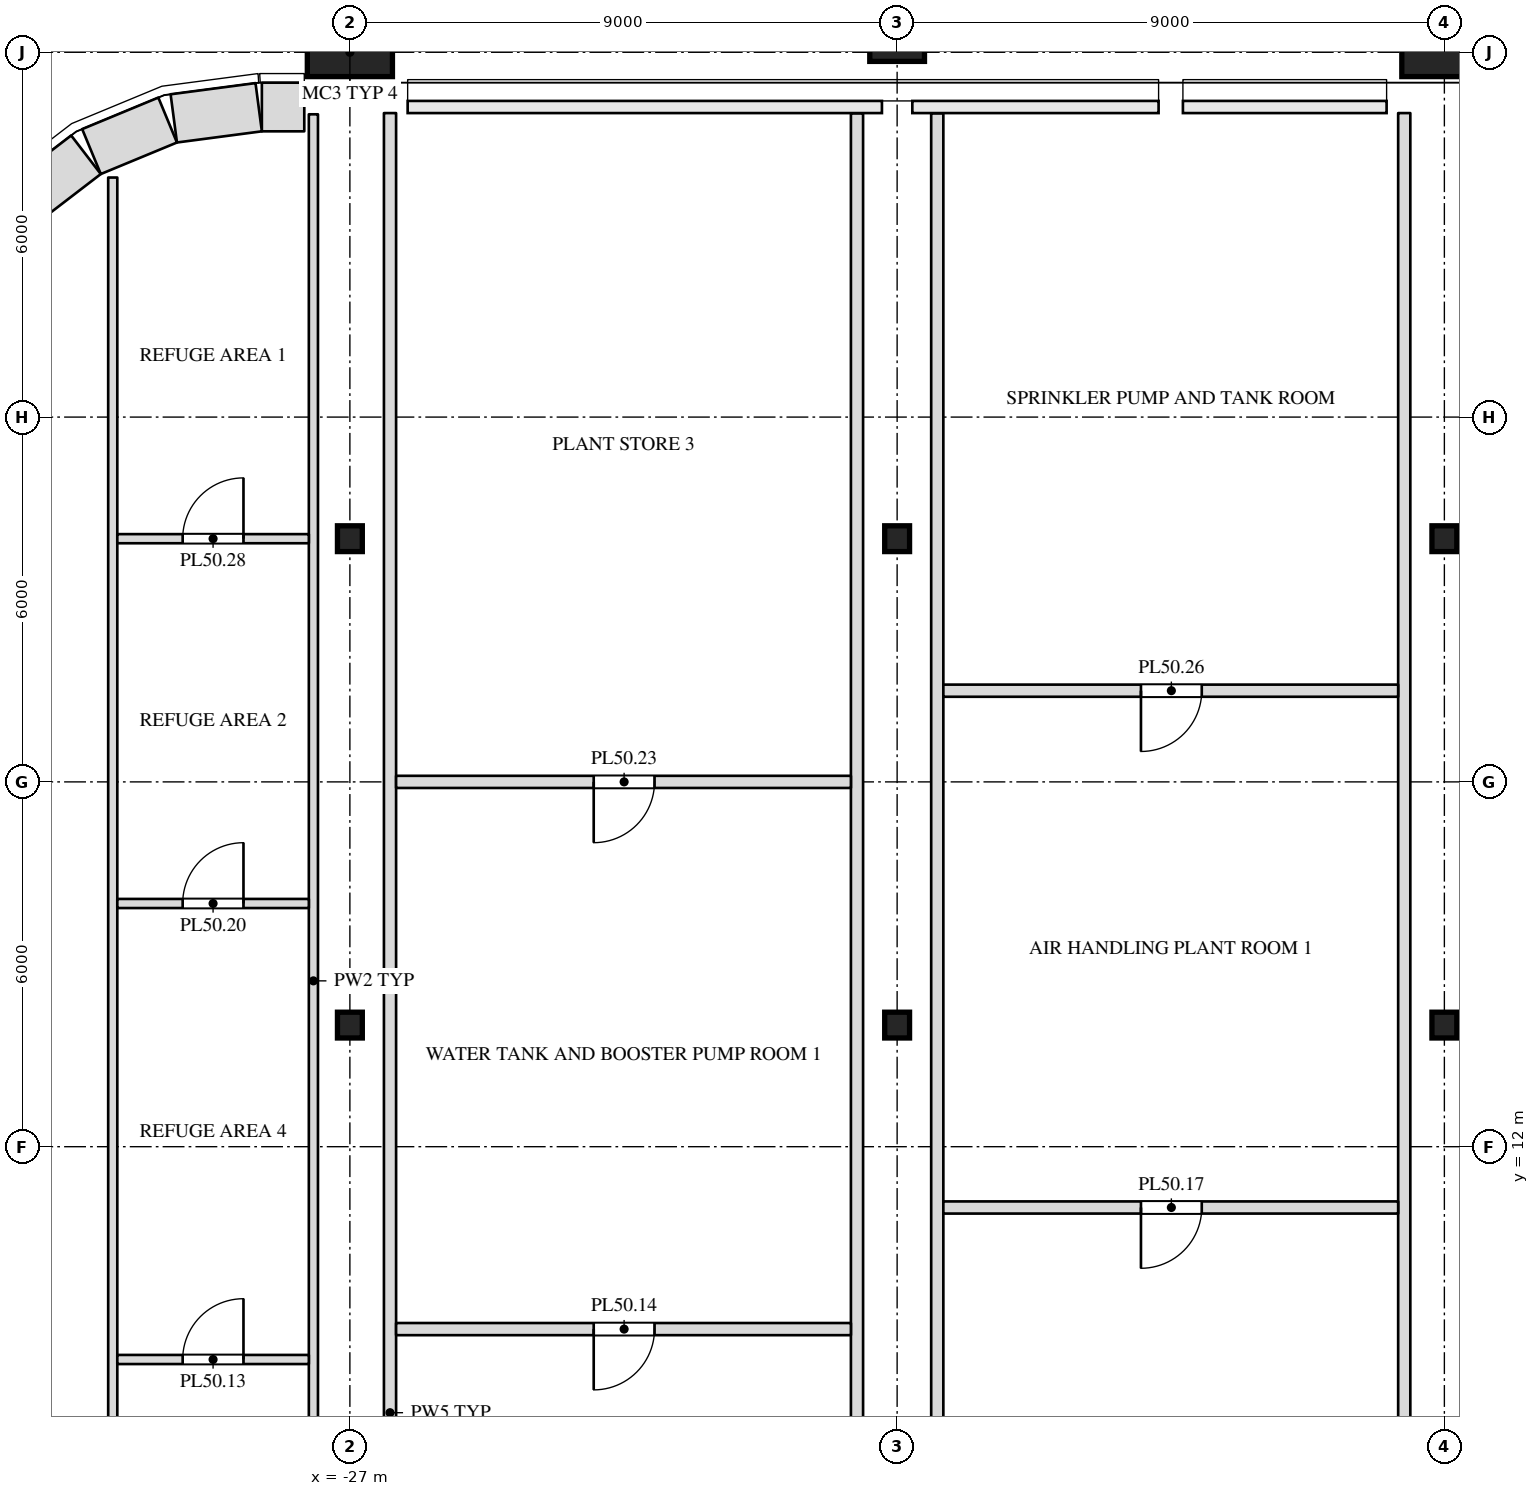
"""IFC4 building model, lengths in metres.
Left out: names, types, materials, properties, quantities, classifications, styles, units other than length and angle.
Written with IfcOpenShell. Run it as: python <this file> out.ifc"""

import sys

from ifc_helpers import new_model, si_unit, direction, frame, frame_2d, origin, origin_2d, place, context, subcontext, project, spatial, rectangle, i_section, extrude, clip, halfspace, element, fill, save


model = new_model("IFC4")
c1 = context("Model", 3, precision=1e-05, world=origin(), true_north=direction((0.0, 1.0)))
c2 = subcontext(c1, "Body", "Model", "MODEL_VIEW")
j1 = project(units=[si_unit("LENGTHUNIT", "METRE"), si_unit("PLANEANGLEUNIT", "RADIAN")], contexts=[c1])
p1 = place(None, origin())
s1 = spatial("IfcSite", under=j1, at=p1, CompositionType="ELEMENT")
p2 = place(p1, origin())
s2 = spatial("IfcBuilding", under=s1, at=p2, CompositionType="ELEMENT")
p3 = place(p2, frame((0.0, 0.0, 216.5)))
s3 = spatial("IfcBuildingStorey", under=s2, at=p3, CompositionType="ELEMENT", Elevation=216.5)
for number, where, z_axis, x_axis in (
    (1, (-27.0, 14.0, 0.0), (0.0, 0.0, 1.0), (1.0, 0.0, 0.0)),
    (2, (-18.0, 14.0, 0.0), (0.0, 0.0, 1.0), (1.0, 0.0, 0.0)),
    (3, (-9.0, 14.0, 0.0), (0.0, 0.0, 1.0), (1.0, 0.0, 0.0)),
    (4, (-27.0, 22.0, 0.0), (0.0, 0.0, 1.0), (1.0, 0.0, 0.0)),
    (5, (-18.0, 22.0, 0.0), (0.0, 0.0, 1.0), (1.0, 0.0, 0.0)),
    (6, (-9.0, 22.0, 0.0), (0.0, 0.0, 1.0), (1.0, 0.0, 0.0)),
):
    element("IfcColumn", number, at=place(p3, frame(where, z_axis=z_axis, x_axis=x_axis)), inside=s3, PredefinedType="COLUMN", context=c2, shape_type="SweptSolid", body=[
        extrude(i_section(OverallWidth=0.409, OverallDepth=0.424, WebThickness=0.033, FlangeThickness=0.052, at=origin_2d()), origin(), (0.0, 0.0, 1.0), 4.0),
    ])
p4 = place(p3, frame((-27.0, 30.0, 0.0), z_axis=(0.0, 0.242535625036, 0.970142500145), x_axis=(-1.0, 0.0, 0.0)))
e7 = element("IfcColumn", 7, at=p4, inside=s3, PredefinedType="COLUMN", context=c2, shape_type="Clipping", body=[
    clip(extrude(rectangle(XDim=1.4, YDim=1.4, at=origin_2d()), origin(), (0.0, 0.0, 1.0), 4.123), halfspace(frame((0.0, 0.0, 3.948)), False)),
])
p5 = place(p3, frame((-18.0, 30.0, 0.0), z_axis=(0.0, 0.242535625036, 0.970142500145), x_axis=(-1.0, 0.0, 0.0)))
e8 = element("IfcColumn", 8, at=p5, inside=s3, PredefinedType="COLUMN", context=c2, shape_type="Clipping", body=[
    clip(extrude(rectangle(XDim=0.9, YDim=0.9, at=origin_2d()), origin(), (0.0, 0.0, 1.0), 4.123), halfspace(frame((0.0, 0.0, 4.01)), False)),
])
p6 = place(p3, frame((-9.0, 30.0, 0.0), z_axis=(0.0, 0.242535625036, 0.970142500145), x_axis=(-1.0, 0.0, 0.0)))
e9 = element("IfcColumn", 9, at=p6, inside=s3, PredefinedType="COLUMN", context=c2, shape_type="Clipping", body=[
    clip(extrude(rectangle(XDim=1.4, YDim=1.4, at=origin_2d()), origin(), (0.0, 0.0, 1.0), 4.123), halfspace(frame((0.0, 0.0, 3.948)), False)),
])
p7 = place(p3, frame((-30.9, 0.475, 0.0), z_axis=(0.0, 0.0, 1.0), x_axis=(0.0, 1.0, 0.0)))
e10 = element("IfcWall", 10, at=p7, inside=s3, PredefinedType="PARTITIONING", context=c2, shape_type="SweptSolid", body=[
    extrude(rectangle(XDim=27.465, YDim=0.15, at=frame_2d((13.732, 0.0))), origin(), (0.0, 0.0, 1.0), 3.8),
])
p8 = place(p3, frame((-27.6, 0.475, 0.0), z_axis=(0.0, 0.0, 1.0), x_axis=(0.0, 1.0, 0.0)))
e11 = element("IfcWall", 11, at=p8, inside=s3, PredefinedType="PARTITIONING", context=c2, shape_type="SweptSolid", body=[
    extrude(rectangle(XDim=28.505, YDim=0.15, at=frame_2d((14.252, 0.0))), origin(), (0.0, 0.0, 1.0), 3.8),
])
p9 = place(p3, frame((-26.34, 0.5, 0.0), z_axis=(0.0, 0.0, 1.0), x_axis=(0.0, 1.0, 0.0)))
e12 = element("IfcWall", 12, at=p9, inside=s3, PredefinedType="PARTITIONING", context=c2, shape_type="SweptSolid", body=[
    extrude(rectangle(XDim=28.5, YDim=0.2, at=frame_2d((14.25, 0.0))), origin(), (0.0, 0.0, 1.0), 3.8),
])
for number, where, z_axis, x_axis in (
    (13, (-18.66, 0.5, 0.0), (0.0, 0.0, 1.0), (0.0, 1.0, 0.0)),
    (14, (-17.34, 0.5, 0.0), (0.0, 0.0, 1.0), (0.0, 1.0, 0.0)),
):
    element("IfcWall", number, at=place(p3, frame(where, z_axis=z_axis, x_axis=x_axis)), inside=s3, PredefinedType="PARTITIONING", context=c2, shape_type="SweptSolid", body=[
        extrude(rectangle(XDim=28.496, YDim=0.2, at=frame_2d((14.248, 0.0))), origin(), (0.0, 0.0, 1.0), 3.8),
    ])
p10 = place(p3, frame((-9.66, 0.5, 0.0), z_axis=(0.0, 0.0, 1.0), x_axis=(0.0, 1.0, 0.0)))
e15 = element("IfcWall", 15, at=p10, inside=s3, PredefinedType="PARTITIONING", context=c2, shape_type="SweptSolid", body=[
    extrude(rectangle(XDim=28.5, YDim=0.2, at=frame_2d((14.25, 0.0))), origin(), (0.0, 0.0, 1.0), 3.8),
])
p11 = place(p3, frame((-30.825, 8.5, 0.0), z_axis=(0.0, 0.0, 1.0), x_axis=(1.0, 0.0, 0.0)))
e16 = element("IfcWall", 16, at=p11, inside=s3, PredefinedType="PARTITIONING", context=c2, shape_type="SweptSolid", body=[
    extrude(rectangle(XDim=3.15, YDim=0.15, at=frame_2d((1.575, 0.0))), origin(), (0.0, 0.0, 1.0), 3.8),
])
p12 = place(p11, frame((1.075, 0.0, 0.0)))
e17 = element("IfcOpeningElement", 17, at=p12, cuts=e16, PredefinedType="OPENING", context=c2, shape_type="SweptSolid", body=[
    extrude(rectangle(XDim=1.0, YDim=2.1, at=frame_2d((0.5, 1.05))), frame((0.0, 0.087, 0.0), z_axis=(0.0, -1.0, 0.0), x_axis=(1.0, 0.0, 0.0)), (0.0, 0.0, 1.0), 0.174),
])
p13 = place(p3, frame((-26.24, 9.0, 0.0), z_axis=(0.0, 0.0, 1.0), x_axis=(1.0, 0.0, 0.0)))
e18 = element("IfcWall", 18, at=p13, inside=s3, PredefinedType="PARTITIONING", context=c2, shape_type="SweptSolid", body=[
    extrude(rectangle(XDim=7.48, YDim=0.2, at=frame_2d((3.74, 0.0))), origin(), (0.0, 0.0, 1.0), 3.8),
])
p14 = place(p13, frame((3.25, 0.0, 0.0)))
e19 = element("IfcOpeningElement", 19, at=p14, cuts=e18, PredefinedType="OPENING", context=c2, shape_type="SweptSolid", body=[
    extrude(rectangle(XDim=1.0, YDim=2.1, at=frame_2d((0.5, 1.05))), frame((0.0, 0.112, 0.0), z_axis=(0.0, -1.0, 0.0), x_axis=(1.0, 0.0, 0.0)), (0.0, 0.0, 1.0), 0.224),
])
p15 = place(p3, frame((-17.24, 11.0, 0.0), z_axis=(0.0, 0.0, 1.0), x_axis=(1.0, 0.0, 0.0)))
e20 = element("IfcWall", 20, at=p15, inside=s3, PredefinedType="PARTITIONING", context=c2, shape_type="SweptSolid", body=[
    extrude(rectangle(XDim=7.48, YDim=0.2, at=frame_2d((3.74, 0.0))), origin(), (0.0, 0.0, 1.0), 3.8),
])
p16 = place(p15, frame((3.25, 0.0, 0.0)))
e21 = element("IfcOpeningElement", 21, at=p16, cuts=e20, PredefinedType="OPENING", context=c2, shape_type="SweptSolid", body=[
    extrude(rectangle(XDim=1.0, YDim=2.1, at=frame_2d((0.5, 1.05))), frame((0.0, 0.112, 0.0), z_axis=(0.0, -1.0, 0.0), x_axis=(1.0, 0.0, 0.0)), (0.0, 0.0, 1.0), 0.224),
])
p17 = place(p3, frame((-30.825, 16.0, 0.0), z_axis=(0.0, 0.0, 1.0), x_axis=(1.0, 0.0, 0.0)))
e22 = element("IfcWall", 22, at=p17, inside=s3, PredefinedType="PARTITIONING", context=c2, shape_type="SweptSolid", body=[
    extrude(rectangle(XDim=3.15, YDim=0.15, at=frame_2d((1.575, 0.0))), origin(), (0.0, 0.0, 1.0), 3.8),
])
p18 = place(p17, frame((1.075, 0.0, 0.0)))
e23 = element("IfcOpeningElement", 23, at=p18, cuts=e22, PredefinedType="OPENING", context=c2, shape_type="SweptSolid", body=[
    extrude(rectangle(XDim=1.0, YDim=2.1, at=frame_2d((0.5, 1.05))), frame((0.0, 0.087, 0.0), z_axis=(0.0, -1.0, 0.0), x_axis=(1.0, 0.0, 0.0)), (0.0, 0.0, 1.0), 0.174),
])
p19 = place(p3, frame((-26.24, 18.0, 0.0), z_axis=(0.0, 0.0, 1.0), x_axis=(1.0, 0.0, 0.0)))
e24 = element("IfcWall", 24, at=p19, inside=s3, PredefinedType="PARTITIONING", context=c2, shape_type="SweptSolid", body=[
    extrude(rectangle(XDim=7.48, YDim=0.2, at=frame_2d((3.74, 0.0))), origin(), (0.0, 0.0, 1.0), 3.8),
])
p20 = place(p19, frame((3.25, 0.0, 0.0)))
e25 = element("IfcOpeningElement", 25, at=p20, cuts=e24, PredefinedType="OPENING", context=c2, shape_type="SweptSolid", body=[
    extrude(rectangle(XDim=1.0, YDim=2.1, at=frame_2d((0.5, 1.05))), frame((0.0, 0.112, 0.0), z_axis=(0.0, -1.0, 0.0), x_axis=(1.0, 0.0, 0.0)), (0.0, 0.0, 1.0), 0.224),
])
p21 = place(p3, frame((-17.24, 19.5, 0.0), z_axis=(0.0, 0.0, 1.0), x_axis=(1.0, 0.0, 0.0)))
e26 = element("IfcWall", 26, at=p21, inside=s3, PredefinedType="PARTITIONING", context=c2, shape_type="SweptSolid", body=[
    extrude(rectangle(XDim=7.48, YDim=0.2, at=frame_2d((3.74, 0.0))), origin(), (0.0, 0.0, 1.0), 3.8),
])
p22 = place(p21, frame((3.25, 0.0, 0.0)))
e27 = element("IfcOpeningElement", 27, at=p22, cuts=e26, PredefinedType="OPENING", context=c2, shape_type="SweptSolid", body=[
    extrude(rectangle(XDim=1.0, YDim=2.1, at=frame_2d((0.5, 1.05))), frame((0.0, 0.112, 0.0), z_axis=(0.0, -1.0, 0.0), x_axis=(1.0, 0.0, 0.0)), (0.0, 0.0, 1.0), 0.224),
])
p23 = place(p3, frame((-30.825, 22.0, 0.0), z_axis=(0.0, 0.0, 1.0), x_axis=(1.0, 0.0, 0.0)))
e28 = element("IfcWall", 28, at=p23, inside=s3, PredefinedType="PARTITIONING", context=c2, shape_type="SweptSolid", body=[
    extrude(rectangle(XDim=3.15, YDim=0.15, at=frame_2d((1.575, 0.0))), origin(), (0.0, 0.0, 1.0), 2.4),
])
p24 = place(p23, frame((1.075, 0.0, 0.0)))
e29 = element("IfcOpeningElement", 29, at=p24, cuts=e28, PredefinedType="OPENING", context=c2, shape_type="SweptSolid", body=[
    extrude(rectangle(XDim=1.0, YDim=2.1, at=frame_2d((0.5, 1.05))), frame((0.0, 0.087, 0.0), z_axis=(0.0, -1.0, 0.0), x_axis=(1.0, 0.0, 0.0)), (0.0, 0.0, 1.0), 0.174),
])
p25 = place(p3, frame((-27.75, 29.1, 0.0), z_axis=(0.0, 0.0, 1.0), x_axis=(-1.0, 0.0, 0.0)))
e30 = element("IfcWall", 30, at=p25, inside=s3, PredefinedType="SOLIDWALL", context=c2, shape_type="SweptSolid", body=[
    extrude(rectangle(XDim=0.698, YDim=0.8, at=frame_2d((0.349, 0.0))), origin(), (0.0, 0.0, 1.0), 3.8),
])
p26 = place(p3, frame((-28.5, 29.097, 0.0), z_axis=(0.0, 0.0, 1.0), x_axis=(-0.99144603414, -0.130517283865, 0.0)))
e31 = element("IfcWall", 31, at=p26, inside=s3, PredefinedType="SOLIDWALL", context=c2, shape_type="SweptSolid", body=[
    extrude(rectangle(XDim=1.408, YDim=0.8, at=frame_2d((0.704, 0.0))), origin(), (0.0, 0.0, 1.0), 3.8),
])
p27 = place(p3, frame((-29.997, 28.886, 0.0), z_axis=(0.0, 0.0, 1.0), x_axis=(-0.923847774587, -0.38276009378, 0.0)))
e32 = element("IfcWall", 32, at=p27, inside=s3, PredefinedType="SOLIDWALL", context=c2, shape_type="SweptSolid", body=[
    extrude(rectangle(XDim=1.355, YDim=0.8, at=frame_2d((0.678, 0.0))), origin(), (0.0, 0.0, 1.0), 3.8),
])
p28 = place(p3, frame((-31.34, 28.315, 0.0), z_axis=(0.0, 0.0, 1.0), x_axis=(-0.793272915452, -0.608866226366, 0.0)))
e33 = element("IfcWall", 33, at=p28, inside=s3, PredefinedType="SOLIDWALL", context=c2, shape_type="SweptSolid", body=[
    extrude(rectangle(XDim=1.356, YDim=0.8, at=frame_2d((0.678, 0.0))), origin(), (0.0, 0.0, 1.0), 3.8),
])
p29 = place(p12, origin())
e34 = element("IfcDoor", 34, at=p29, inside=s3, OperationType="SINGLE_SWING_RIGHT", PredefinedType="DOOR", context=c2, shape_type="SweptSolid", body=[
    extrude(rectangle(XDim=1.0, YDim=2.1, at=frame_2d((0.5, 1.05))), frame((0.0, 0.025, 0.0), z_axis=(0.0, -1.0, 0.0), x_axis=(1.0, 0.0, 0.0)), (0.0, 0.0, 1.0), 0.05),
])
fill(e17, e34)
p30 = place(p14, origin())
e35 = element("IfcDoor", 35, at=p30, inside=s3, OperationType="SINGLE_SWING_RIGHT", PredefinedType="DOOR", context=c2, shape_type="SweptSolid", body=[
    extrude(rectangle(XDim=1.0, YDim=2.1, at=frame_2d((0.5, 1.05))), frame((0.0, 0.025, 0.0), z_axis=(0.0, -1.0, 0.0), x_axis=(1.0, 0.0, 0.0)), (0.0, 0.0, 1.0), 0.05),
])
fill(e19, e35)
p31 = place(p16, origin())
e36 = element("IfcDoor", 36, at=p31, inside=s3, OperationType="SINGLE_SWING_RIGHT", PredefinedType="DOOR", context=c2, shape_type="SweptSolid", body=[
    extrude(rectangle(XDim=1.0, YDim=2.1, at=frame_2d((0.5, 1.05))), frame((0.0, 0.025, 0.0), z_axis=(0.0, -1.0, 0.0), x_axis=(1.0, 0.0, 0.0)), (0.0, 0.0, 1.0), 0.05),
])
fill(e21, e36)
p32 = place(p18, origin())
e37 = element("IfcDoor", 37, at=p32, inside=s3, OperationType="SINGLE_SWING_RIGHT", PredefinedType="DOOR", context=c2, shape_type="SweptSolid", body=[
    extrude(rectangle(XDim=1.0, YDim=2.1, at=frame_2d((0.5, 1.05))), frame((0.0, 0.025, 0.0), z_axis=(0.0, -1.0, 0.0), x_axis=(1.0, 0.0, 0.0)), (0.0, 0.0, 1.0), 0.05),
])
fill(e23, e37)
p33 = place(p20, origin())
e38 = element("IfcDoor", 38, at=p33, inside=s3, OperationType="SINGLE_SWING_RIGHT", PredefinedType="DOOR", context=c2, shape_type="SweptSolid", body=[
    extrude(rectangle(XDim=1.0, YDim=2.1, at=frame_2d((0.5, 1.05))), frame((0.0, 0.025, 0.0), z_axis=(0.0, -1.0, 0.0), x_axis=(1.0, 0.0, 0.0)), (0.0, 0.0, 1.0), 0.05),
])
fill(e25, e38)
p34 = place(p22, origin())
e39 = element("IfcDoor", 39, at=p34, inside=s3, OperationType="SINGLE_SWING_RIGHT", PredefinedType="DOOR", context=c2, shape_type="SweptSolid", body=[
    extrude(rectangle(XDim=1.0, YDim=2.1, at=frame_2d((0.5, 1.05))), frame((0.0, 0.025, 0.0), z_axis=(0.0, -1.0, 0.0), x_axis=(1.0, 0.0, 0.0)), (0.0, 0.0, 1.0), 0.05),
])
fill(e27, e39)
p35 = place(p24, origin())
e40 = element("IfcDoor", 40, at=p35, inside=s3, OperationType="SINGLE_SWING_RIGHT", PredefinedType="DOOR", context=c2, shape_type="SweptSolid", body=[
    extrude(rectangle(XDim=1.0, YDim=2.1, at=frame_2d((0.5, 1.05))), frame((0.0, 0.025, 0.0), z_axis=(0.0, -1.0, 0.0), x_axis=(1.0, 0.0, 0.0)), (0.0, 0.0, 1.0), 0.05),
])
fill(e29, e40)
save(model, sys.argv[1])
